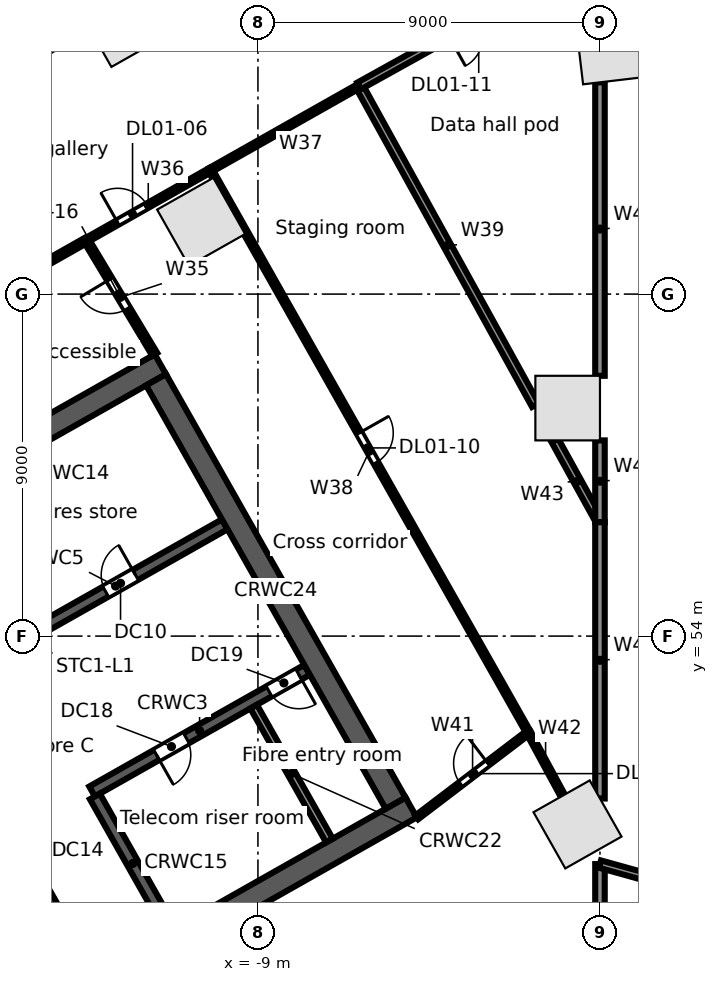
"""IFC4 building model, lengths in metres.
Left out: names, types, materials, properties, quantities, classifications, styles, units other than length and angle.
Written with IfcOpenShell. Run it as: python <this file> out.ifc"""

import sys

from ifc_helpers import new_model, si_unit, direction, frame, frame_2d, origin, origin_2d, place, context, subcontext, project, spatial, rectangle, extrude, element, fill, save


model = new_model("IFC4")
c1 = context("Model", 3, precision=1e-05, world=origin(), true_north=direction((0.0, 1.0)))
c2 = subcontext(c1, "Body", "Model", "MODEL_VIEW")
j1 = project(units=[si_unit("LENGTHUNIT", "METRE"), si_unit("PLANEANGLEUNIT", "RADIAN")], contexts=[c1])
p1 = place(None, origin())
s1 = spatial("IfcSite", under=j1, at=p1, CompositionType="ELEMENT")
p2 = place(p1, origin())
s2 = spatial("IfcBuilding", under=s1, at=p2, CompositionType="ELEMENT")
p3 = place(p2, frame((0.0, 0.0, 11.5)))
s3 = spatial("IfcBuildingStorey", under=s2, at=p3, CompositionType="ELEMENT", Elevation=11.5)
for number, where, z_axis, x_axis in (
    (1, (0.3, 69.464, 0.0), (0.0, 0.0, 1.0), (-0.993, -0.118, 0.0)),
    (2, (-10.495, 64.902, 0.0), (0.0, 0.0, 1.0), (-0.87, -0.492, 0.0)),
    (3, (-0.591, 49.044, 0.0), (0.0, 0.0, 1.0), (0.87, 0.492, 0.0)),
    (4, (-0.85, 60.0, 0.0), (0.0, 0.0, 1.0), (0.0, 1.0, 0.0)),
):
    element("IfcColumn", number, at=place(p3, frame(where, z_axis=z_axis, x_axis=x_axis)), inside=s3, PredefinedType="COLUMN", context=c2, shape_type="SweptSolid", body=[
        extrude(rectangle(XDim=1.7, YDim=1.7, at=origin_2d()), origin(), (0.0, 0.0, 1.0), 5.0),
    ])
p4 = place(p3, frame((-12.667, 69.659, 0.0), z_axis=(0.0, 0.0, 1.0), x_axis=(-0.87035569594, -0.492423560103, 0.0)))
e5 = element("IfcColumn", 5, at=p4, inside=s3, PredefinedType="COLUMN", context=c2, shape_type="SweptSolid", body=[
    extrude(rectangle(XDim=1.0, YDim=1.0, at=origin_2d()), origin(), (0.0, 0.0, 1.0), 5.0),
])
p5 = place(p3, frame((-63.707, 41.701, 0.0), z_axis=(0.0, 0.0, 1.0), x_axis=(0.870355510268, 0.492423888277, 0.0)))
e6 = element("IfcWall", 6, at=p5, inside=s3, PredefinedType="STANDARD", context=c2, shape_type="SweptSolid", body=[
    extrude(rectangle(XDim=67.903, YDim=0.3, at=frame_2d((33.952, 0.0))), origin(), (0.0, 0.0, 1.0), 4.65),
])
p6 = place(p3, frame((-18.024, 42.104, 0.0), z_axis=(0.0, 0.0, 1.0), x_axis=(0.870360574057, 0.492414937962, 0.0)))
e7 = element("IfcWall", 7, at=p6, inside=s3, PredefinedType="SOLIDWALL", context=c2, shape_type="SweptSolid", body=[
    extrude(rectangle(XDim=15.0, YDim=0.6, at=frame_2d((7.5, 0.0))), origin(), (0.0, 0.0, 1.0), 4.65),
])
p7 = place(p6, frame((6.1, 0.0, 0.0)))
e8 = element("IfcOpeningElement", 8, at=p7, cuts=e7, PredefinedType="OPENING", context=c2, shape_type="SweptSolid", body=[
    extrude(rectangle(XDim=1.2, YDim=2.1, at=frame_2d((0.6, 1.05))), frame((0.0, 0.31, 0.0), z_axis=(0.0, -1.0, 0.0), x_axis=(1.0, 0.0, 0.0)), (0.0, 0.0, 1.0), 0.62),
])
p8 = place(p3, frame((-13.365, 49.911, 0.0), z_axis=(0.0, 0.0, 1.0), x_axis=(0.870340995471, 0.49244954219, 0.0)))
e9 = element("IfcWall", 9, at=p8, inside=s3, PredefinedType="SOLIDWALL", context=c2, shape_type="SweptSolid", body=[
    extrude(rectangle(XDim=6.5, YDim=0.3, at=frame_2d((3.25, 0.0))), origin(), (0.0, 0.0, 1.0), 4.65),
])
p9 = place(p8, frame((1.95, 0.0, 0.0)))
e10 = element("IfcOpeningElement", 10, at=p9, cuts=e9, PredefinedType="OPENING", context=c2, shape_type="SweptSolid", body=[
    extrude(rectangle(XDim=0.9, YDim=2.1, at=frame_2d((0.45, 1.05))), frame((0.0, 0.16, 0.0), z_axis=(0.0, -1.0, 0.0), x_axis=(1.0, 0.0, 0.0)), (0.0, 0.0, 1.0), 0.32),
])
p10 = place(p8, frame((5.35, 0.0, 0.0)))
e11 = element("IfcOpeningElement", 11, at=p10, cuts=e9, PredefinedType="OPENING", context=c2, shape_type="SweptSolid", body=[
    extrude(rectangle(XDim=0.9, YDim=2.1, at=frame_2d((0.45, 1.05))), frame((0.0, 0.16, 0.0), z_axis=(0.0, -1.0, 0.0), x_axis=(1.0, 0.0, 0.0)), (0.0, 0.0, 1.0), 0.32),
])
p11 = place(p3, frame((-15.618, 53.691, 0.0), z_axis=(0.0, 0.0, 1.0), x_axis=(0.870356769198, 0.492421663121, 0.0)))
e12 = element("IfcWall", 12, at=p11, inside=s3, PredefinedType="SOLIDWALL", context=c2, shape_type="SweptSolid", body=[
    extrude(rectangle(XDim=6.6, YDim=0.3, at=frame_2d((3.3, 0.0))), origin(), (0.0, 0.0, 1.0), 4.65),
])
p12 = place(p11, frame((3.0, 0.0, 0.0)))
e13 = element("IfcOpeningElement", 13, at=p12, cuts=e12, PredefinedType="OPENING", context=c2, shape_type="SweptSolid", body=[
    extrude(rectangle(XDim=0.9, YDim=2.1, at=frame_2d((0.45, 1.05))), frame((0.0, 0.16, 0.0), z_axis=(0.0, -1.0, 0.0), x_axis=(1.0, 0.0, 0.0)), (0.0, 0.0, 1.0), 0.32),
])
p13 = place(p3, frame((-24.623, 53.767, 0.0), z_axis=(0.0, 0.0, 1.0), x_axis=(0.870356627484, 0.492421913601, 0.0)))
e14 = element("IfcWall", 14, at=p13, inside=s3, PredefinedType="SOLIDWALL", context=c2, shape_type="SweptSolid", body=[
    extrude(rectangle(XDim=15.0, YDim=0.6, at=frame_2d((7.5, 0.0))), origin(), (0.0, 0.0, 1.0), 4.65),
])
for number, where, z_axis, x_axis in (
    (15, (-15.379, 48.599, 0.0), (0.0, 0.0, 1.0), (0.492, -0.87, 0.0)),
    (16, (-13.291, 49.781, 0.0), (0.0, 0.0, 1.0), (0.492, -0.87, 0.0)),
):
    element("IfcWall", number, at=place(p3, frame(where, z_axis=z_axis, x_axis=x_axis)), inside=s3, PredefinedType="SOLIDWALL", context=c2, shape_type="SweptSolid", body=[
        extrude(rectangle(XDim=4.05, YDim=0.3, at=frame_2d((2.025, 0.0))), origin(), (0.0, 0.0, 1.0), 4.65),
    ])
p14 = place(p3, frame((-9.113, 52.144, 0.0), z_axis=(0.0, 0.0, 1.0), x_axis=(0.492394910396, -0.870371904542, 0.0)))
e17 = element("IfcWall", 17, at=p14, inside=s3, PredefinedType="PARTITIONING", context=c2, shape_type="SweptSolid", body=[
    extrude(rectangle(XDim=4.05, YDim=0.2, at=frame_2d((2.025, 0.0))), origin(), (0.0, 0.0, 1.0), 4.65),
])
p15 = place(p3, frame((-11.681, 60.744, 0.0), z_axis=(0.0, 0.0, 1.0), x_axis=(0.492426772896, -0.870353878221, 0.0)))
e18 = element("IfcWall", 18, at=p15, inside=s3, PredefinedType="SOLIDWALL", context=c2, shape_type="SweptSolid", body=[
    extrude(rectangle(XDim=12.8, YDim=0.6, at=frame_2d((6.4, 0.0))), origin(), (0.0, 0.0, 1.0), 4.65),
])
p16 = place(p3, frame((-16.346, 62.816, 0.0), z_axis=(0.0, 0.0, 1.0), x_axis=(0.870334637055, 0.492460779699, 0.0)))
e19 = element("IfcWall", 19, at=p16, inside=s3, PredefinedType="PARTITIONING", context=c2, shape_type="SweptSolid", body=[
    extrude(rectangle(XDim=3.249, YDim=0.15, at=frame_2d((1.625, 0.0))), origin(), (0.0, 0.0, 1.0), 4.65),
])
p17 = place(p3, frame((-13.518, 64.416, 0.0), z_axis=(0.0, 0.0, 1.0), x_axis=(0.514875058642, -0.857265229663, 0.0)))
e20 = element("IfcWall", 20, at=p17, inside=s3, PredefinedType="PARTITIONING", context=c2, shape_type="SweptSolid", body=[
    extrude(rectangle(XDim=3.502, YDim=0.15, at=frame_2d((1.751, 0.0))), origin(), (0.0, 0.0, 1.0), 3.93),
])
p18 = place(p17, frame((1.2, 0.0, 0.0)))
e21 = element("IfcOpeningElement", 21, at=p18, cuts=e20, PredefinedType="OPENING", context=c2, shape_type="SweptSolid", body=[
    extrude(rectangle(XDim=0.9, YDim=2.1, at=frame_2d((0.45, 1.05))), frame((0.0, 0.085, 0.0), z_axis=(0.0, -1.0, 0.0), x_axis=(1.0, 0.0, 0.0)), (0.0, 0.0, 1.0), 0.17),
])
p19 = place(p3, frame((-13.518, 64.416, 0.0), z_axis=(0.0, 0.0, 1.0), x_axis=(0.870338454914, 0.492454032268, 0.0)))
e22 = element("IfcWall", 22, at=p19, inside=s3, PredefinedType="PARTITIONING", context=c2, shape_type="SweptSolid", body=[
    extrude(rectangle(XDim=3.75, YDim=0.125, at=frame_2d((1.875, 0.0))), origin(), (0.0, 0.0, 1.0), 3.712),
])
p20 = place(p19, frame((0.95, 0.0, 0.0)))
e23 = element("IfcOpeningElement", 23, at=p20, cuts=e22, PredefinedType="OPENING", context=c2, shape_type="SweptSolid", body=[
    extrude(rectangle(XDim=0.9, YDim=2.1, at=frame_2d((0.45, 1.05))), frame((0.0, 0.073, 0.0), z_axis=(0.0, -1.0, 0.0), x_axis=(1.0, 0.0, 0.0)), (0.0, 0.0, 1.0), 0.145),
])
p21 = place(p3, frame((-10.254, 66.263, 0.0), z_axis=(0.0, 0.0, 1.0), x_axis=(0.870454697906, 0.492248533664, 0.0)))
e24 = element("IfcWall", 24, at=p21, inside=s3, PredefinedType="PARTITIONING", context=c2, shape_type="SweptSolid", body=[
    extrude(rectangle(XDim=4.5, YDim=0.125, at=frame_2d((2.25, 0.0))), origin(), (0.0, 0.0, 1.0), 4.65),
])
p22 = place(p3, frame((-10.254, 66.263, 0.0), z_axis=(0.0, 0.0, 1.0), x_axis=(0.492411664329, -0.870362426138, 0.0)))
e25 = element("IfcWall", 25, at=p22, inside=s3, PredefinedType="PARTITIONING", context=c2, shape_type="SweptSolid", body=[
    extrude(rectangle(XDim=17.0, YDim=0.125, at=frame_2d((8.5, 0.0))), origin(), (0.0, 0.0, 1.0), 3.712),
])
p23 = place(p22, frame((7.95, 0.0, 0.0)))
e26 = element("IfcOpeningElement", 26, at=p23, cuts=e25, PredefinedType="OPENING", context=c2, shape_type="SweptSolid", body=[
    extrude(rectangle(XDim=0.9, YDim=2.1, at=frame_2d((0.45, 1.05))), frame((0.0, 0.073, 0.0), z_axis=(0.0, -1.0, 0.0), x_axis=(1.0, 0.0, 0.0)), (0.0, 0.0, 1.0), 0.145),
])
p24 = place(p3, frame((-6.337, 68.478, 0.0), z_axis=(0.0, 0.0, 1.0), x_axis=(0.483322867171, -0.875442177456, 0.0)))
e27 = element("IfcWall", 27, at=p24, inside=s3, PredefinedType="PARTITIONING", context=c2, shape_type="SweptSolid", body=[
    extrude(rectangle(XDim=9.594, YDim=0.2, at=frame_2d((4.797, 0.0))), origin(), (0.0, 0.0, 1.0), 3.712),
])
p25 = place(p3, frame((-6.337, 68.478, 0.0), z_axis=(0.0, 0.0, 1.0), x_axis=(0.87407148623, 0.485797320864, 0.0)))
e28 = element("IfcWall", 28, at=p25, inside=s3, PredefinedType="PARTITIONING", context=c2, shape_type="SweptSolid", body=[
    extrude(rectangle(XDim=7.25, YDim=0.2, at=frame_2d((3.625, 0.0))), origin(), (0.0, 0.0, 1.0), 3.93),
])
p26 = place(p25, frame((2.7, 0.0, 0.0)))
e29 = element("IfcOpeningElement", 29, at=p26, cuts=e28, PredefinedType="OPENING", context=c2, shape_type="SweptSolid", body=[
    extrude(rectangle(XDim=1.8, YDim=2.1, at=frame_2d((0.9, 1.05))), frame((0.0, 0.11, 0.0), z_axis=(0.0, -1.0, 0.0), x_axis=(1.0, 0.0, 0.0)), (0.0, 0.0, 1.0), 0.22),
])
p27 = place(p3, frame((-4.821, 49.23, 0.0), z_axis=(0.0, 0.0, 1.0), x_axis=(0.795615322848, 0.605802160816, 0.0)))
e30 = element("IfcWall", 30, at=p27, inside=s3, PredefinedType="PARTITIONING", context=c2, shape_type="SweptSolid", body=[
    extrude(rectangle(XDim=3.693, YDim=0.125, at=frame_2d((1.846, 0.0))), origin(), (0.0, 0.0, 1.0), 4.65),
])
p28 = place(p27, frame((1.45, 0.0, 0.0)))
e31 = element("IfcOpeningElement", 31, at=p28, cuts=e30, PredefinedType="OPENING", context=c2, shape_type="SweptSolid", body=[
    extrude(rectangle(XDim=0.9, YDim=2.1, at=frame_2d((0.45, 1.05))), frame((0.0, 0.073, 0.0), z_axis=(0.0, -1.0, 0.0), x_axis=(1.0, 0.0, 0.0)), (0.0, 0.0, 1.0), 0.145),
])
p29 = place(p3, frame((-1.883, 51.467, 0.0), z_axis=(0.0, 0.0, 1.0), x_axis=(0.477162952876, -0.878814836244, 0.0)))
e32 = element("IfcWall", 32, at=p29, inside=s3, PredefinedType="PARTITIONING", context=c2, shape_type="SweptSolid", body=[
    extrude(rectangle(XDim=1.895, YDim=0.125, at=frame_2d((0.947, 0.0))), origin(), (0.0, 0.0, 1.0), 4.65),
])
p30 = place(p3, frame((-1.187, 59.15, 0.0), z_axis=(0.0, 0.0, 1.0), x_axis=(0.483345381597, -0.875429747089, 0.0)))
e33 = element("IfcWall", 33, at=p30, inside=s3, PredefinedType="PARTITIONING", context=c2, shape_type="SweptSolid", body=[
    extrude(rectangle(XDim=2.456, YDim=0.2, at=frame_2d((1.228, 0.0))), origin(), (0.0, 0.0, 1.0), 4.65),
])
p31 = place(p3, frame((0.0, 43.806, 0.0), z_axis=(0.0, 0.0, 1.0), x_axis=(0.0, 1.0, 0.0)))
e34 = element("IfcWall", 34, at=p31, inside=s3, PredefinedType="PARTITIONING", context=c2, shape_type="SweptSolid", body=[
    extrude(rectangle(XDim=4.194, YDim=0.25, at=frame_2d((2.097, 0.0))), origin(), (0.0, 0.0, 1.0), 3.712),
])
p32 = place(p31, frame((1.2, 0.0, 0.0)))
e35 = element("IfcOpeningElement", 35, at=p32, cuts=e34, PredefinedType="OPENING", context=c2, shape_type="SweptSolid", body=[
    extrude(rectangle(XDim=1.8, YDim=2.1, at=frame_2d((0.9, 1.05))), frame((0.0, 0.135, 0.0), z_axis=(0.0, -1.0, 0.0), x_axis=(1.0, 0.0, 0.0)), (0.0, 0.0, 1.0), 0.27),
])
p33 = place(p3, frame((0.0, 48.0, 0.0), z_axis=(0.0, 0.0, 1.0), x_axis=(0.963400508162, -0.268066150181, 0.0)))
e36 = element("IfcWall", 36, at=p33, inside=s3, PredefinedType="PARTITIONING", context=c2, shape_type="SweptSolid", body=[
    extrude(rectangle(XDim=4.443, YDim=0.2, at=frame_2d((2.221, 0.0))), origin(), (0.0, 0.0, 1.0), 4.65),
])
p34 = place(p33, frame((1.2, 0.0, 0.0)))
e37 = element("IfcOpeningElement", 37, at=p34, cuts=e36, PredefinedType="OPENING", context=c2, shape_type="SweptSolid", body=[
    extrude(rectangle(XDim=1.8, YDim=2.1, at=frame_2d((0.9, 1.05))), frame((0.0, 0.11, 0.0), z_axis=(0.0, -1.0, 0.0), x_axis=(1.0, 0.0, 0.0)), (0.0, 0.0, 1.0), 0.22),
])
p35 = place(p3, frame((0.0, 49.726, 0.0), z_axis=(0.0, 0.0, 1.0), x_axis=(0.0, 1.0, 0.0)))
e38 = element("IfcWall", 38, at=p35, inside=s3, PredefinedType="PARTITIONING", context=c2, shape_type="SweptSolid", body=[
    extrude(rectangle(XDim=7.274, YDim=0.25, at=frame_2d((3.637, 0.0))), origin(), (0.0, 0.0, 1.0), 4.65),
])
p36 = place(p3, frame((0.0, 57.0, 0.0), z_axis=(0.0, 0.0, 1.0), x_axis=(0.0, 1.0, 0.0)))
e39 = element("IfcWall", 39, at=p36, inside=s3, PredefinedType="PARTITIONING", context=c2, shape_type="SweptSolid", body=[
    extrude(rectangle(XDim=2.15, YDim=0.25, at=frame_2d((1.075, 0.0))), origin(), (0.0, 0.0, 1.0), 4.65),
])
p37 = place(p3, frame((0.0, 60.85, 0.0), z_axis=(0.0, 0.0, 1.0), x_axis=(0.0, 1.0, 0.0)))
e40 = element("IfcWall", 40, at=p37, inside=s3, PredefinedType="PARTITIONING", context=c2, shape_type="SweptSolid", body=[
    extrude(rectangle(XDim=7.723, YDim=0.25, at=frame_2d((3.861, 0.0))), origin(), (0.0, 0.0, 1.0), 3.93),
])
p38 = place(p3, frame((0.0, 72.0, 0.0), z_axis=(0.0, 0.0, 1.0), x_axis=(0.960375968852, -0.278707729443, 0.0)))
e41 = element("IfcWall", 41, at=p38, inside=s3, PredefinedType="PARTITIONING", context=c2, shape_type="SweptSolid", body=[
    extrude(rectangle(XDim=11.058, YDim=0.2, at=frame_2d((5.529, 0.0))), origin(), (0.0, 0.0, 1.0), 3.712),
])
p39 = place(p12, origin())
e42 = element("IfcDoor", 42, at=p39, inside=s3, OperationType="SINGLE_SWING_RIGHT", PredefinedType="DOOR", context=c2, shape_type="SweptSolid", body=[
    extrude(rectangle(XDim=0.9, YDim=2.1, at=frame_2d((0.45, 1.05))), frame((0.0, 0.025, 0.0), z_axis=(0.0, -1.0, 0.0), x_axis=(1.0, 0.0, 0.0)), (0.0, 0.0, 1.0), 0.05),
])
fill(e13, e42)
p40 = place(p9, frame((0.9, 0.0, 0.0), z_axis=(0.0, 0.0, 1.0), x_axis=(-1.0, 0.0, 0.0)))
e43 = element("IfcDoor", 43, at=p40, inside=s3, OperationType="SINGLE_SWING_RIGHT", PredefinedType="DOOR", context=c2, shape_type="SweptSolid", body=[
    extrude(rectangle(XDim=0.9, YDim=2.1, at=frame_2d((0.45, 1.05))), frame((0.0, 0.025, 0.0), z_axis=(0.0, -1.0, 0.0), x_axis=(1.0, 0.0, 0.0)), (0.0, 0.0, 1.0), 0.05),
])
fill(e10, e43)
p41 = place(p10, frame((0.9, 0.0, 0.0), z_axis=(0.0, 0.0, 1.0), x_axis=(-1.0, 0.0, 0.0)))
e44 = element("IfcDoor", 44, at=p41, inside=s3, OperationType="SINGLE_SWING_LEFT", PredefinedType="DOOR", context=c2, shape_type="SweptSolid", body=[
    extrude(rectangle(XDim=0.9, YDim=2.1, at=frame_2d((0.45, 1.05))), frame((0.0, 0.025, 0.0), z_axis=(0.0, -1.0, 0.0), x_axis=(1.0, 0.0, 0.0)), (0.0, 0.0, 1.0), 0.05),
])
fill(e11, e44)
p42 = place(p28, origin())
e45 = element("IfcDoor", 45, at=p42, inside=s3, OperationType="SINGLE_SWING_RIGHT", PredefinedType="DOOR", context=c2, shape_type="SweptSolid", body=[
    extrude(rectangle(XDim=0.9, YDim=2.1, at=frame_2d((0.45, 1.05))), frame((0.0, 0.025, 0.0), z_axis=(0.0, -1.0, 0.0), x_axis=(1.0, 0.0, 0.0)), (0.0, 0.0, 1.0), 0.05),
])
fill(e31, e45)
p43 = place(p20, origin())
e46 = element("IfcDoor", 46, at=p43, inside=s3, OperationType="SINGLE_SWING_LEFT", PredefinedType="DOOR", context=c2, shape_type="SweptSolid", body=[
    extrude(rectangle(XDim=0.9, YDim=2.1, at=frame_2d((0.45, 1.05))), frame((0.0, 0.025, 0.0), z_axis=(0.0, -1.0, 0.0), x_axis=(1.0, 0.0, 0.0)), (0.0, 0.0, 1.0), 0.05),
])
fill(e23, e46)
p44 = place(p23, origin())
e47 = element("IfcDoor", 47, at=p44, inside=s3, OperationType="SINGLE_SWING_LEFT", PredefinedType="DOOR", context=c2, shape_type="SweptSolid", body=[
    extrude(rectangle(XDim=0.9, YDim=2.1, at=frame_2d((0.45, 1.05))), frame((0.0, 0.025, 0.0), z_axis=(0.0, -1.0, 0.0), x_axis=(1.0, 0.0, 0.0)), (0.0, 0.0, 1.0), 0.05),
])
fill(e26, e47)
p45 = place(p18, frame((0.9, 0.0, 0.0), z_axis=(0.0, 0.0, 1.0), x_axis=(-1.0, 0.0, 0.0)))
e48 = element("IfcDoor", 48, at=p45, inside=s3, OperationType="SINGLE_SWING_RIGHT", PredefinedType="DOOR", context=c2, shape_type="SweptSolid", body=[
    extrude(rectangle(XDim=0.9, YDim=2.1, at=frame_2d((0.45, 1.05))), frame((0.0, 0.025, 0.0), z_axis=(0.0, -1.0, 0.0), x_axis=(1.0, 0.0, 0.0)), (0.0, 0.0, 1.0), 0.05),
])
fill(e21, e48)
save(model, sys.argv[1])
